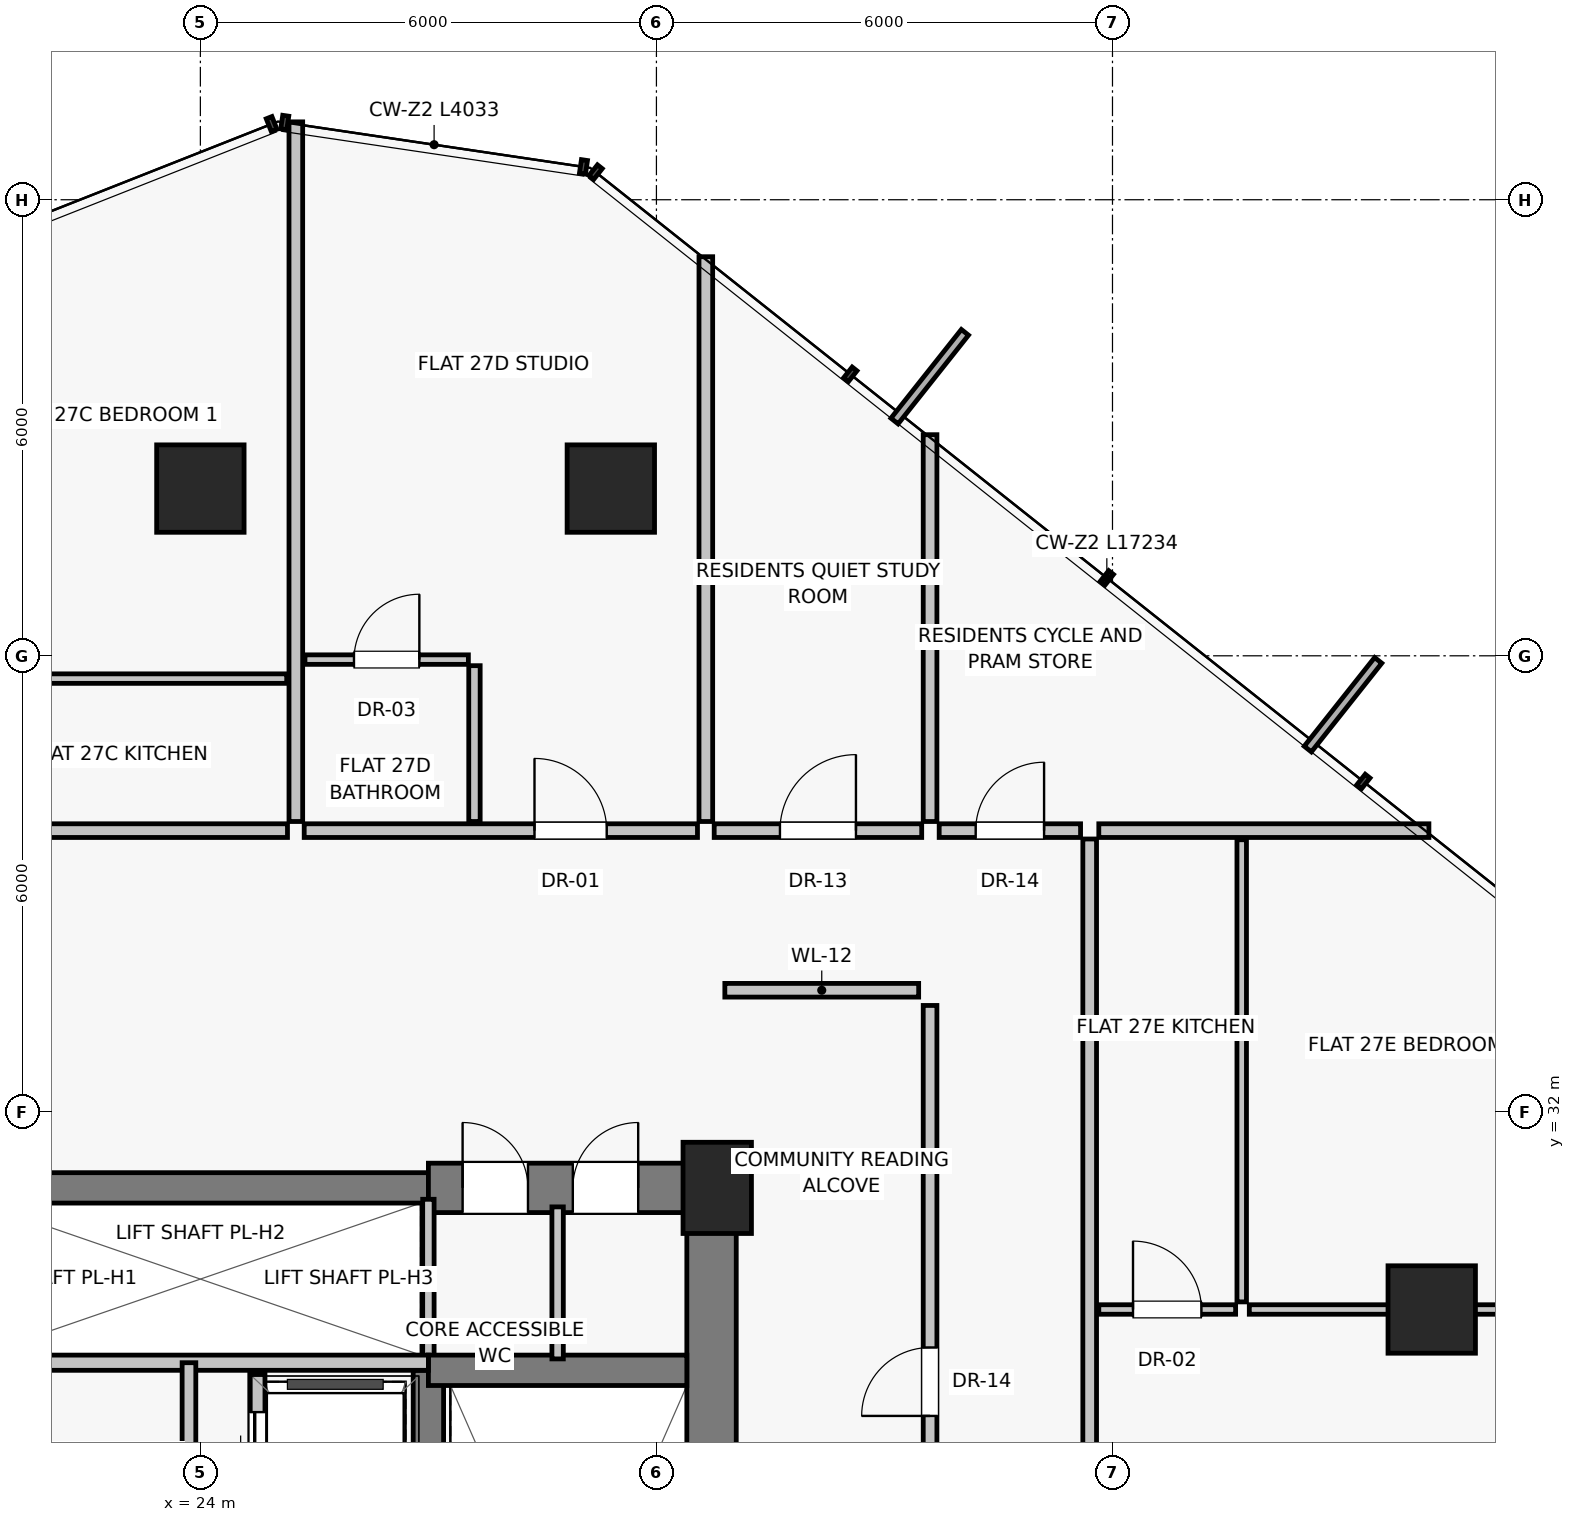
"""IFC4 building model, lengths in metres.
Left out: names, types, materials, properties, quantities, classifications, styles, units other than length and angle.
Written with IfcOpenShell. Run it as: python <this file> out.ifc"""

import sys

from ifc_helpers import new_model, si_unit, direction, frame, frame_2d, origin, origin_2d, place, context, subcontext, project, spatial, rectangle, extrude, source, transform, mapped, element, fill, save


model = new_model("IFC4")
c1 = context("Model", 3, precision=1e-05, world=origin(), true_north=direction((0.0, 1.0)))
c2 = subcontext(c1, "Body", "Model", "MODEL_VIEW")
j1 = project(units=[si_unit("LENGTHUNIT", "METRE"), si_unit("PLANEANGLEUNIT", "RADIAN")], contexts=[c1])
p1 = place(None, origin())
s1 = spatial("IfcSite", under=j1, at=p1, CompositionType="ELEMENT")
p2 = place(p1, origin())
s2 = spatial("IfcBuilding", under=s1, at=p2, CompositionType="ELEMENT")
p3 = place(p2, frame((0.0, 0.0, 99.2)))
s3 = spatial("IfcBuildingStorey", under=s2, at=p3, CompositionType="ELEMENT", Elevation=99.2)
p4 = place(p3, frame((30.8, 31.0, 0.0), z_axis=(0.0, 0.0, 1.0), x_axis=(1.0, 0.0, 0.0)))
e1 = element("IfcColumn", 1, at=p4, inside=s3, PredefinedType="PILASTER", context=c2, shape_type="SweptSolid", body=[
    extrude(rectangle(XDim=0.9, YDim=1.2, at=origin_2d()), origin(), (0.0, 0.0, 1.0), 3.25),
])
for number, where, z_axis, x_axis in (
    (2, (40.2, 29.4, 0.0), (0.0, 0.0, 1.0), (1.0, 0.0, 0.0)),
    (3, (29.4, 40.2, 0.0), (0.0, 0.0, 1.0), (1.0, 0.0, 0.0)),
    (4, (24.0, 40.2, 0.0), (0.0, 0.0, 1.0), (1.0, 0.0, 0.0)),
):
    element("IfcColumn", number, at=place(p3, frame(where, z_axis=z_axis, x_axis=x_axis)), inside=s3, PredefinedType="COLUMN", context=c2, shape_type="SweptSolid", body=[
        extrude(rectangle(XDim=1.15, YDim=1.15, at=origin_2d()), origin(), (0.0, 0.0, 1.0), 3.25),
    ])
p5 = place(p3, frame((30.725, 16.8, 0.0), z_axis=(0.0, 0.0, 1.0), x_axis=(0.0, 1.0, 0.0)))
e5 = element("IfcWall", 5, at=p5, inside=s3, PredefinedType="SHEAR", context=c2, shape_type="SweptSolid", body=[
    extrude(rectangle(XDim=14.2, YDim=0.65, at=frame_2d((7.1, 0.0))), origin(), (0.0, 0.0, 1.0), 3.0),
])
p6 = place(p3, frame((21.0, 31.0, 0.0), z_axis=(0.0, 0.0, 1.0), x_axis=(1.0, 0.0, 0.0)))
e6 = element("IfcWall", 6, at=p6, inside=s3, PredefinedType="SHEAR", context=c2, shape_type="SweptSolid", body=[
    extrude(rectangle(XDim=6.0, YDim=0.4, at=frame_2d((3.0, 0.0))), origin(), (0.0, 0.0, 1.0), 3.0),
])
p7 = place(p3, frame((27.0, 31.0, 0.0), z_axis=(0.0, 0.0, 1.0), x_axis=(1.0, 0.0, 0.0)))
e7 = element("IfcWall", 7, at=p7, inside=s3, PredefinedType="SHEAR", context=c2, shape_type="SweptSolid", body=[
    extrude(rectangle(XDim=3.8, YDim=0.65, at=frame_2d((1.9, 0.0))), origin(), (0.0, 0.0, 1.0), 3.0),
])
p8 = place(p7, frame((0.45, 0.0, 0.0)))
e8 = element("IfcOpeningElement", 8, at=p8, cuts=e7, PredefinedType="OPENING", context=c2, shape_type="SweptSolid", body=[
    extrude(rectangle(XDim=0.86, YDim=2.01, at=frame_2d((0.43, 1.005))), frame((0.0, 0.335, 0.0), z_axis=(0.0, -1.0, 0.0), x_axis=(1.0, 0.0, 0.0)), (0.0, 0.0, 1.0), 0.67),
])
p9 = place(p7, frame((1.9, 0.0, 0.0)))
e9 = element("IfcOpeningElement", 9, at=p9, cuts=e7, PredefinedType="OPENING", context=c2, shape_type="SweptSolid", body=[
    extrude(rectangle(XDim=0.86, YDim=2.01, at=frame_2d((0.43, 1.005))), frame((0.0, 0.335, 0.0), z_axis=(0.0, -1.0, 0.0), x_axis=(1.0, 0.0, 0.0)), (0.0, 0.0, 1.0), 0.67),
])
p10 = place(p3, frame((27.0, 28.65, 0.0), z_axis=(0.0, 0.0, 1.0), x_axis=(0.0, 1.0, 0.0)))
e10 = element("IfcWall", 10, at=p10, inside=s3, PredefinedType="PARTITIONING", context=c2, shape_type="SweptSolid", body=[
    extrude(rectangle(XDim=2.2, YDim=0.15, at=frame_2d((1.1, 0.0))), origin(), (0.0, 0.0, 1.0), 3.0),
])
p11 = place(p3, frame((27.0, 19.8, 0.0), z_axis=(0.0, 0.0, 1.0), x_axis=(0.0, 1.0, 0.0)))
e11 = element("IfcWall", 11, at=p11, inside=s3, PredefinedType="SHEAR", context=c2, shape_type="SweptSolid", body=[
    extrude(rectangle(XDim=8.8, YDim=0.4, at=frame_2d((4.4, 0.0))), origin(), (0.0, 0.0, 1.0), 3.0),
])
p12 = place(p3, frame((27.0, 28.6, 0.0), z_axis=(0.0, 0.0, 1.0), x_axis=(1.0, 0.0, 0.0)))
e12 = element("IfcWall", 12, at=p12, inside=s3, PredefinedType="SHEAR", context=c2, shape_type="SweptSolid", body=[
    extrude(rectangle(XDim=3.4, YDim=0.4, at=frame_2d((1.7, 0.0))), origin(), (0.0, 0.0, 1.0), 3.0),
])
p13 = place(p3, frame((21.0, 28.7, 0.0), z_axis=(0.0, 0.0, 1.0), x_axis=(1.0, 0.0, 0.0)))
e13 = element("IfcWall", 13, at=p13, inside=s3, PredefinedType="SOLIDWALL", context=c2, shape_type="SweptSolid", body=[
    extrude(rectangle(XDim=6.0, YDim=0.2, at=frame_2d((3.0, 0.0))), origin(), (0.0, 0.0, 1.0), 3.0),
])
p14 = place(p3, frame((23.85, 22.6, 0.0), z_axis=(0.0, 0.0, 1.0), x_axis=(0.0, 1.0, 0.0)))
e14 = element("IfcWall", 14, at=p14, inside=s3, PredefinedType="PARTITIONING", context=c2, shape_type="SweptSolid", body=[
    extrude(rectangle(XDim=6.1, YDim=0.18, at=frame_2d((3.05, 0.0))), origin(), (0.0, 0.0, 1.0), 3.0),
])
p15 = place(p14, frame((2.4, 0.0, 0.0)))
e15 = element("IfcOpeningElement", 15, at=p15, cuts=e14, PredefinedType="OPENING", context=c2, shape_type="SweptSolid", body=[
    extrude(rectangle(XDim=0.9, YDim=2.01, at=frame_2d((0.45, 1.005))), frame((0.0, 0.1, 0.0), z_axis=(0.0, -1.0, 0.0), x_axis=(1.0, 0.0, 0.0)), (0.0, 0.0, 1.0), 0.2),
])
p16 = place(p3, frame((24.75, 22.6, 0.0), z_axis=(0.0, 0.0, 1.0), x_axis=(0.0, 1.0, 0.0)))
e16 = element("IfcWall", 16, at=p16, inside=s3, PredefinedType="SOLIDWALL", context=c2, shape_type="SweptSolid", body=[
    extrude(rectangle(XDim=5.95, YDim=0.2, at=frame_2d((2.975, 0.0))), origin(), (0.0, 0.0, 1.0), 3.0),
])
p17 = place(p16, frame((0.45, 0.0, 0.0)))
e17 = element("IfcOpeningElement", 17, at=p17, cuts=e16, PredefinedType="OPENING", context=c2, shape_type="SweptSolid", body=[
    extrude(rectangle(XDim=1.1, YDim=2.08, at=frame_2d((0.55, 1.04))), frame((0.0, 0.11, 0.0), z_axis=(0.0, -1.0, 0.0), x_axis=(1.0, 0.0, 0.0)), (0.0, 0.0, 1.0), 0.22),
])
p18 = place(p16, frame((2.4, 0.0, 0.0)))
e18 = element("IfcOpeningElement", 18, at=p18, cuts=e16, PredefinedType="OPENING", context=c2, shape_type="SweptSolid", body=[
    extrude(rectangle(XDim=1.1, YDim=2.08, at=frame_2d((0.55, 1.04))), frame((0.0, 0.11, 0.0), z_axis=(0.0, -1.0, 0.0), x_axis=(1.0, 0.0, 0.0)), (0.0, 0.0, 1.0), 0.22),
])
p19 = place(p16, frame((4.35, 0.0, 0.0)))
e19 = element("IfcOpeningElement", 19, at=p19, cuts=e16, PredefinedType="OPENING", context=c2, shape_type="SweptSolid", body=[
    extrude(rectangle(XDim=1.1, YDim=2.08, at=frame_2d((0.55, 1.04))), frame((0.0, 0.11, 0.0), z_axis=(0.0, -1.0, 0.0), x_axis=(1.0, 0.0, 0.0)), (0.0, 0.0, 1.0), 0.22),
])
p20 = place(p3, frame((28.7, 28.75, 0.0), z_axis=(0.0, 0.0, 1.0), x_axis=(0.0, 1.0, 0.0)))
e20 = element("IfcWall", 20, at=p20, inside=s3, PredefinedType="PARTITIONING", context=c2, shape_type="SweptSolid", body=[
    extrude(rectangle(XDim=2.0, YDim=0.15, at=frame_2d((1.0, 0.0))), origin(), (0.0, 0.0, 1.0), 3.0),
])
p21 = place(p3, frame((33.6, 24.2, 0.0), z_axis=(0.0, 0.0, 1.0), x_axis=(0.0, 1.0, 0.0)))
e21 = element("IfcWall", 21, at=p21, inside=s3, PredefinedType="PARTITIONING", context=c2, shape_type="SweptSolid", body=[
    extrude(rectangle(XDim=9.2, YDim=0.18, at=frame_2d((4.6, 0.0))), origin(), (0.0, 0.0, 1.0), 3.0),
])
p22 = place(p21, frame((3.8, 0.0, 0.0)))
e22 = element("IfcOpeningElement", 22, at=p22, cuts=e21, PredefinedType="OPENING", context=c2, shape_type="SweptSolid", body=[
    extrude(rectangle(XDim=0.9, YDim=2.01, at=frame_2d((0.45, 1.005))), frame((0.0, 0.1, 0.0), z_axis=(0.0, -1.0, 0.0), x_axis=(1.0, 0.0, 0.0)), (0.0, 0.0, 1.0), 0.2),
])
p23 = place(p3, frame((30.9, 33.6, 0.0), z_axis=(0.0, 0.0, 1.0), x_axis=(1.0, 0.0, 0.0)))
e23 = element("IfcWall", 23, at=p23, inside=s3, PredefinedType="PARTITIONING", context=c2, shape_type="SweptSolid", body=[
    extrude(rectangle(XDim=2.55, YDim=0.18, at=frame_2d((1.275, 0.0))), origin(), (0.0, 0.0, 1.0), 3.0),
])
p24 = place(p3, frame((33.6, 35.82, 0.0), z_axis=(0.0, 0.0, 1.0), x_axis=(0.0, 1.0, 0.0)))
e24 = element("IfcWall", 24, at=p24, inside=s3, PredefinedType="PARTITIONING", context=c2, shape_type="SweptSolid", body=[
    extrude(rectangle(XDim=5.089, YDim=0.18, at=frame_2d((2.544, 0.0))), origin(), (0.0, 0.0, 1.0), 3.0),
])
p25 = place(p3, frame((14.51, 35.7, 0.0), z_axis=(0.0, 0.0, 1.0), x_axis=(1.0, 0.0, 0.0)))
e25 = element("IfcWall", 25, at=p25, inside=s3, PredefinedType="PARTITIONING", context=c2, shape_type="SweptSolid", body=[
    extrude(rectangle(XDim=10.636, YDim=0.18, at=frame_2d((5.318, 0.0))), origin(), (0.0, 0.0, 1.0), 2.58),
])
p26 = place(p25, frame((3.525, 0.0, 0.0)))
e26 = element("IfcOpeningElement", 26, at=p26, cuts=e25, PredefinedType="OPENING", context=c2, shape_type="SweptSolid", body=[
    extrude(rectangle(XDim=0.95, YDim=2.02, at=frame_2d((0.475, 1.01))), frame((0.0, 0.1, 0.0), z_axis=(0.0, -1.0, 0.0), x_axis=(1.0, 0.0, 0.0)), (0.0, 0.0, 1.0), 0.2),
])
p27 = place(p3, frame((20.471, 37.7, 0.0), z_axis=(0.0, 0.0, 1.0), x_axis=(1.0, 0.0, 0.0)))
e27 = element("IfcWall", 27, at=p27, inside=s3, PredefinedType="PARTITIONING", context=c2, shape_type="SweptSolid", body=[
    extrude(rectangle(XDim=4.665, YDim=0.125, at=frame_2d((2.333, 0.0))), origin(), (0.0, 0.0, 1.0), 3.0),
])
p28 = place(p3, frame((25.256, 35.82, 0.0), z_axis=(0.0, 0.0, 1.0), x_axis=(0.0, 1.0, 0.0)))
e28 = element("IfcWall", 28, at=p28, inside=s3, PredefinedType="PARTITIONING", context=c2, shape_type="SweptSolid", body=[
    extrude(rectangle(XDim=9.204, YDim=0.18, at=frame_2d((4.602, 0.0))), origin(), (0.0, 0.0, 1.0), 3.0),
])
p29 = place(p3, frame((30.76, 35.7, 0.0), z_axis=(0.0, 0.0, 1.0), x_axis=(1.0, 0.0, 0.0)))
e29 = element("IfcWall", 29, at=p29, inside=s3, PredefinedType="PARTITIONING", context=c2, shape_type="SweptSolid", body=[
    extrude(rectangle(XDim=2.73, YDim=0.18, at=frame_2d((1.365, 0.0))), origin(), (0.0, 0.0, 1.0), 3.0),
])
p30 = place(p29, frame((0.865, 0.0, 0.0)))
e30 = element("IfcOpeningElement", 30, at=p30, cuts=e29, PredefinedType="OPENING", context=c2, shape_type="SweptSolid", body=[
    extrude(rectangle(XDim=1.0, YDim=2.01, at=frame_2d((0.5, 1.005))), frame((0.0, 0.1, 0.0), z_axis=(0.0, -1.0, 0.0), x_axis=(1.0, 0.0, 0.0)), (0.0, 0.0, 1.0), 0.2),
])
p31 = place(p3, frame((30.65, 35.82, 0.0), z_axis=(0.0, 0.0, 1.0), x_axis=(0.0, 1.0, 0.0)))
e31 = element("IfcWall", 31, at=p31, inside=s3, PredefinedType="PARTITIONING", context=c2, shape_type="SweptSolid", body=[
    extrude(rectangle(XDim=7.43, YDim=0.18, at=frame_2d((3.715, 0.0))), origin(), (0.0, 0.0, 1.0), 3.0),
])
p32 = place(p3, frame((25.366, 35.7, 0.0), z_axis=(0.0, 0.0, 1.0), x_axis=(1.0, 0.0, 0.0)))
e32 = element("IfcWall", 32, at=p32, inside=s3, PredefinedType="PARTITIONING", context=c2, shape_type="SweptSolid", body=[
    extrude(rectangle(XDim=5.174, YDim=0.18, at=frame_2d((2.587, 0.0))), origin(), (0.0, 0.0, 1.0), 2.58),
])
p33 = place(p32, frame((3.03, 0.0, 0.0)))
e33 = element("IfcOpeningElement", 33, at=p33, cuts=e32, PredefinedType="OPENING", context=c2, shape_type="SweptSolid", body=[
    extrude(rectangle(XDim=0.95, YDim=2.02, at=frame_2d((0.475, 1.01))), frame((0.0, 0.1, 0.0), z_axis=(0.0, -1.0, 0.0), x_axis=(1.0, 0.0, 0.0)), (0.0, 0.0, 1.0), 0.2),
])
p34 = place(p3, frame((27.606, 35.82, 0.0), z_axis=(0.0, 0.0, 1.0), x_axis=(0.0, 1.0, 0.0)))
e34 = element("IfcWall", 34, at=p34, inside=s3, PredefinedType="PARTITIONING", context=c2, shape_type="SweptSolid", body=[
    extrude(rectangle(XDim=2.05, YDim=0.15, at=frame_2d((1.025, 0.0))), origin(), (0.0, 0.0, 1.0), 3.0),
])
p35 = place(p3, frame((25.376, 37.95, 0.0), z_axis=(0.0, 0.0, 1.0), x_axis=(1.0, 0.0, 0.0)))
e35 = element("IfcWall", 35, at=p35, inside=s3, PredefinedType="PARTITIONING", context=c2, shape_type="SweptSolid", body=[
    extrude(rectangle(XDim=2.15, YDim=0.125, at=frame_2d((1.075, 0.0))), origin(), (0.0, 0.0, 1.0), 3.0),
])
p36 = place(p35, frame((0.645, 0.0, 0.0)))
e36 = element("IfcOpeningElement", 36, at=p36, cuts=e35, PredefinedType="OPENING", context=c2, shape_type="SweptSolid", body=[
    extrude(rectangle(XDim=0.86, YDim=2.01, at=frame_2d((0.43, 1.005))), frame((0.0, 0.073, 0.0), z_axis=(0.0, -1.0, 0.0), x_axis=(1.0, 0.0, 0.0)), (0.0, 0.0, 1.0), 0.145),
])
p37 = place(p3, frame((35.82, 35.7, 0.0), z_axis=(0.0, 0.0, 1.0), x_axis=(1.0, 0.0, 0.0)))
e37 = element("IfcWall", 37, at=p37, inside=s3, PredefinedType="PARTITIONING", context=c2, shape_type="SweptSolid", body=[
    extrude(rectangle(XDim=4.343, YDim=0.18, at=frame_2d((2.171, 0.0))), origin(), (0.0, 0.0, 1.0), 3.0),
])
p38 = place(p3, frame((35.7, 18.71, 0.0), z_axis=(0.0, 0.0, 1.0), x_axis=(0.0, 1.0, 0.0)))
e38 = element("IfcWall", 38, at=p38, inside=s3, PredefinedType="PARTITIONING", context=c2, shape_type="SweptSolid", body=[
    extrude(rectangle(XDim=16.88, YDim=0.18, at=frame_2d((8.44, 0.0))), origin(), (0.0, 0.0, 1.0), 2.58),
])
p39 = place(p38, frame((5.94, 0.0, 0.0)))
e39 = element("IfcOpeningElement", 39, at=p39, cuts=e38, PredefinedType="OPENING", context=c2, shape_type="SweptSolid", body=[
    extrude(rectangle(XDim=0.95, YDim=2.02, at=frame_2d((0.475, 1.01))), frame((0.0, 0.1, 0.0), z_axis=(0.0, -1.0, 0.0), x_axis=(1.0, 0.0, 0.0)), (0.0, 0.0, 1.0), 0.2),
])
p40 = place(p3, frame((35.82, 29.4, 0.0), z_axis=(0.0, 0.0, 1.0), x_axis=(1.0, 0.0, 0.0)))
e40 = element("IfcWall", 40, at=p40, inside=s3, PredefinedType="PARTITIONING", context=c2, shape_type="SweptSolid", body=[
    extrude(rectangle(XDim=1.8, YDim=0.125, at=frame_2d((0.9, 0.0))), origin(), (0.0, 0.0, 1.0), 2.378),
])
p41 = place(p40, frame((0.45, 0.0, 0.0)))
e41 = element("IfcOpeningElement", 41, at=p41, cuts=e40, PredefinedType="OPENING", context=c2, shape_type="SweptSolid", body=[
    extrude(rectangle(XDim=0.9, YDim=2.01, at=frame_2d((0.45, 1.005))), frame((0.0, 0.073, 0.0), z_axis=(0.0, -1.0, 0.0), x_axis=(1.0, 0.0, 0.0)), (0.0, 0.0, 1.0), 0.145),
])
p42 = place(p3, frame((37.7, 29.5, 0.0), z_axis=(0.0, 0.0, 1.0), x_axis=(0.0, 1.0, 0.0)))
e42 = element("IfcWall", 42, at=p42, inside=s3, PredefinedType="PARTITIONING", context=c2, shape_type="SweptSolid", body=[
    extrude(rectangle(XDim=6.08, YDim=0.125, at=frame_2d((3.04, 0.0))), origin(), (0.0, 0.0, 1.0), 3.0),
])
p43 = place(p3, frame((37.8, 29.4, 0.0), z_axis=(0.0, 0.0, 1.0), x_axis=(1.0, 0.0, 0.0)))
e43 = element("IfcWall", 43, at=p43, inside=s3, PredefinedType="PARTITIONING", context=c2, shape_type="SweptSolid", body=[
    extrude(rectangle(XDim=6.424, YDim=0.125, at=frame_2d((3.212, 0.0))), origin(), (0.0, 0.0, 1.0), 2.378),
])
p44 = place(p43, frame((3.83, 0.0, 0.0)))
e44 = element("IfcOpeningElement", 44, at=p44, cuts=e43, PredefinedType="OPENING", context=c2, shape_type="SweptSolid", body=[
    extrude(rectangle(XDim=0.9, YDim=2.01, at=frame_2d((0.45, 1.005))), frame((0.0, 0.073, 0.0), z_axis=(0.0, -1.0, 0.0), x_axis=(1.0, 0.0, 0.0)), (0.0, 0.0, 1.0), 0.145),
])
p45 = place(p3, frame((33.72, 35.7, 0.0), z_axis=(0.0, 0.0, 1.0), x_axis=(1.0, 0.0, 0.0)))
e45 = element("IfcWall", 45, at=p45, inside=s3, PredefinedType="PARTITIONING", context=c2, shape_type="SweptSolid", body=[
    extrude(rectangle(XDim=1.86, YDim=0.18, at=frame_2d((0.93, 0.0))), origin(), (0.0, 0.0, 1.0), 3.0),
])
p46 = place(p45, frame((0.48, 0.0, 0.0)))
e46 = element("IfcOpeningElement", 46, at=p46, cuts=e45, PredefinedType="OPENING", context=c2, shape_type="SweptSolid", body=[
    extrude(rectangle(XDim=0.9, YDim=2.01, at=frame_2d((0.45, 1.005))), frame((0.0, 0.1, 0.0), z_axis=(0.0, -1.0, 0.0), x_axis=(1.0, 0.0, 0.0)), (0.0, 0.0, 1.0), 0.2),
])
m1 = source(origin(), c2, "Body", "SweptSolid", [
    extrude(rectangle(XDim=0.86, YDim=2.01, at=frame_2d((0.43, 1.005))), frame((0.0, 0.025, 0.0), z_axis=(0.0, -1.0, 0.0), x_axis=(1.0, 0.0, 0.0)), (0.0, 0.0, 1.0), 0.05),
])
p47 = place(p8, origin())
e47 = element("IfcDoor", 47, at=p47, inside=s3, OperationType="SINGLE_SWING_LEFT", PredefinedType="DOOR", context=c2, shape_type="MappedRepresentation", body=[
    mapped(m1, transform((0.0, 0.0, 0.0), scale=1.0)),
])
fill(e8, e47)
p48 = place(p9, origin())
e48 = element("IfcDoor", 48, at=p48, inside=s3, OperationType="SINGLE_SWING_RIGHT", PredefinedType="DOOR", context=c2, shape_type="MappedRepresentation", body=[
    mapped(m1, transform((0.0, 0.0, 0.0), scale=1.0)),
])
fill(e9, e48)
m2 = source(origin(), c2, "Body", "SweptSolid", [
    extrude(rectangle(XDim=1.1, YDim=2.08, at=frame_2d((0.55, 1.04))), frame((0.0, 0.025, 0.0), z_axis=(0.0, -1.0, 0.0), x_axis=(1.0, 0.0, 0.0)), (0.0, 0.0, 1.0), 0.05),
])
p49 = place(p19, origin())
e49 = element("IfcDoor", 49, at=p49, inside=s3, OperationType="SLIDING_TO_LEFT", PredefinedType="DOOR", context=c2, shape_type="MappedRepresentation", body=[
    mapped(m2, transform((0.0, 0.0, 0.0), scale=1.0)),
])
fill(e19, e49)
m3 = source(origin(), c2, "Body", "SweptSolid", [
    extrude(rectangle(XDim=0.9, YDim=2.01, at=frame_2d((0.45, 1.005))), frame((0.0, 0.025, 0.0), z_axis=(0.0, -1.0, 0.0), x_axis=(1.0, 0.0, 0.0)), (0.0, 0.0, 1.0), 0.05),
])
p50 = place(p22, origin())
e50 = element("IfcDoor", 50, at=p50, inside=s3, OperationType="SINGLE_SWING_LEFT", PredefinedType="DOOR", context=c2, shape_type="MappedRepresentation", body=[
    mapped(m3, transform((0.0, 0.0, 0.0), scale=1.0)),
])
fill(e22, e50)
m4 = source(origin(), c2, "Body", "SweptSolid", [
    extrude(rectangle(XDim=1.0, YDim=2.01, at=frame_2d((0.5, 1.005))), frame((0.0, 0.025, 0.0), z_axis=(0.0, -1.0, 0.0), x_axis=(1.0, 0.0, 0.0)), (0.0, 0.0, 1.0), 0.05),
])
p51 = place(p30, origin())
e51 = element("IfcDoor", 51, at=p51, inside=s3, OperationType="SINGLE_SWING_RIGHT", PredefinedType="DOOR", context=c2, shape_type="MappedRepresentation", body=[
    mapped(m4, transform((0.0, 0.0, 0.0), scale=1.0)),
])
fill(e30, e51)
m5 = source(origin(), c2, "Body", "SweptSolid", [
    extrude(rectangle(XDim=0.95, YDim=2.02, at=frame_2d((0.475, 1.01))), frame((0.0, 0.025, 0.0), z_axis=(0.0, -1.0, 0.0), x_axis=(1.0, 0.0, 0.0)), (0.0, 0.0, 1.0), 0.05),
])
p52 = place(p33, origin())
e52 = element("IfcDoor", 52, at=p52, inside=s3, OperationType="SINGLE_SWING_LEFT", PredefinedType="DOOR", context=c2, shape_type="MappedRepresentation", body=[
    mapped(m5, transform((0.0, 0.0, 0.0), scale=1.0)),
])
fill(e33, e52)
p53 = place(p36, origin())
e53 = element("IfcDoor", 53, at=p53, inside=s3, OperationType="SINGLE_SWING_RIGHT", PredefinedType="DOOR", context=c2, shape_type="MappedRepresentation", body=[
    mapped(m1, transform((0.0, 0.0, 0.0), scale=1.0)),
])
fill(e36, e53)
p54 = place(p41, origin())
e54 = element("IfcDoor", 54, at=p54, inside=s3, OperationType="SINGLE_SWING_LEFT", PredefinedType="DOOR", context=c2, shape_type="MappedRepresentation", body=[
    mapped(m3, transform((0.0, 0.0, 0.0), scale=1.0)),
])
fill(e41, e54)
p55 = place(p46, origin())
e55 = element("IfcDoor", 55, at=p55, inside=s3, OperationType="SINGLE_SWING_RIGHT", PredefinedType="DOOR", context=c2, shape_type="MappedRepresentation", body=[
    mapped(m3, transform((0.0, 0.0, 0.0), scale=1.0)),
])
fill(e46, e55)
save(model, sys.argv[1])
